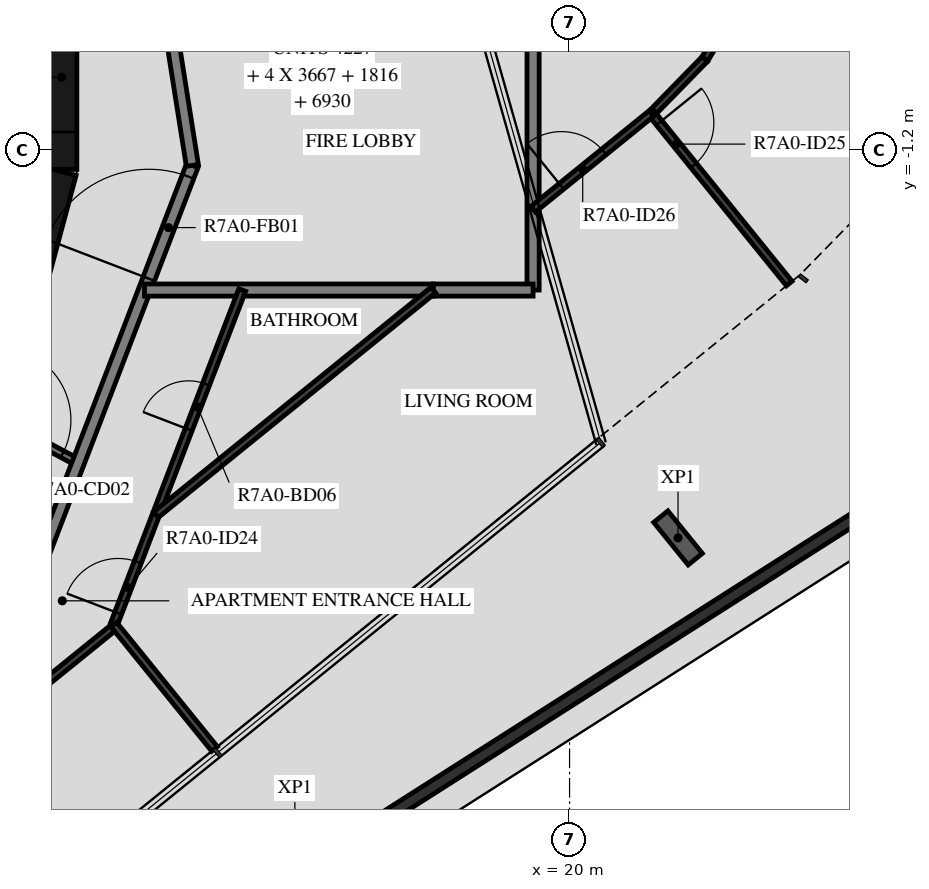
"""IFC4 building model, lengths in metres.
Left out: names, types, materials, properties, quantities, classifications, styles, units other than length and angle.
Written with IfcOpenShell. Run it as: python <this file> out.ifc"""

import sys

from ifc_helpers import new_model, si_unit, direction, frame, frame_2d, origin, origin_2d, place, context, subcontext, project, spatial, rectangle, i_section, extrude, element, fill, save


model = new_model("IFC4")
c1 = context("Model", 3, precision=1e-05, world=origin(), true_north=direction((0.0, 1.0)))
c2 = subcontext(c1, "Body", "Model", "MODEL_VIEW")
j1 = project(units=[si_unit("LENGTHUNIT", "METRE"), si_unit("PLANEANGLEUNIT", "RADIAN")], contexts=[c1])
p1 = place(None, origin())
s1 = spatial("IfcSite", under=j1, at=p1, CompositionType="ELEMENT")
p2 = place(p1, origin())
s2 = spatial("IfcBuilding", under=s1, at=p2, CompositionType="ELEMENT")
p3 = place(p2, frame((0.0, 0.0, 263.4)))
s3 = spatial("IfcBuildingStorey", under=s2, at=p3, CompositionType="ELEMENT", Elevation=263.4)
p4 = place(p3, frame((21.784, -7.576, -0.45), z_axis=(0.0, 0.0, 1.0), x_axis=(-0.777146167973, -0.629320136024, 0.0)))
e1 = element("IfcColumn", 1, at=p4, inside=s3, PredefinedType="COLUMN", context=c2, shape_type="SweptSolid", body=[
    extrude(i_section(OverallWidth=0.3, OverallDepth=0.9, WebThickness=0.019, FlangeThickness=0.035, FilletRadius=0.03, at=origin_2d()), origin(), (0.0, 0.0, 1.0), 3.57),
])
p5 = place(p3, frame((24.757, -7.212, 0.03), z_axis=(0.0, 0.0, 1.0), x_axis=(-0.843392095095, -0.537298589177, 0.0)))
e2 = element("IfcWall", 2, at=p5, inside=s3, PredefinedType="PARAPET", context=c2, shape_type="SweptSolid", body=[
    extrude(rectangle(XDim=34.009, YDim=0.2, at=frame_2d((17.004, 0.0))), origin(), (0.0, 0.0, 1.0), 1.5),
])
p6 = place(p3, frame((10.858, -4.479, 0.0), z_axis=(0.0, 0.0, 1.0), x_axis=(0.258734743916, 0.965948410781, 0.0)))
e3 = element("IfcWall", 3, at=p6, inside=s3, PredefinedType="SHEAR", context=c2, shape_type="SweptSolid", body=[
    extrude(rectangle(XDim=3.033, YDim=0.5, at=frame_2d((1.516, 0.0))), origin(), (0.0, 0.0, 1.0), 3.12),
])
p7 = place(p3, frame((11.647, -1.516, 0.0), z_axis=(0.0, 0.0, 1.0), x_axis=(0.0, 1.0, 0.0)))
e4 = element("IfcWall", 4, at=p7, inside=s3, PredefinedType="SHEAR", context=c2, shape_type="SweptSolid", body=[
    extrude(rectangle(XDim=3.033, YDim=0.5, at=frame_2d((1.516, 0.0))), origin(), (0.0, 0.0, 1.0), 3.12),
])
p8 = place(p7, frame((0.616, 0.0, 0.0)))
e5 = element("IfcOpeningElement", 5, at=p8, cuts=e4, PredefinedType="OPENING", context=c2, shape_type="SweptSolid", body=[
    extrude(rectangle(XDim=1.8, YDim=2.1, at=frame_2d((0.9, 1.05))), frame((0.0, 0.26, 0.0), z_axis=(0.0, -1.0, 0.0), x_axis=(1.0, 0.0, 0.0)), (0.0, 0.0, 1.0), 0.52),
])
p9 = place(p3, frame((10.511, -5.589, 0.0), z_axis=(0.0, 0.0, 1.0), x_axis=(0.882983002821, -0.469404960273, 0.0)))
e6 = element("IfcWall", 6, at=p9, inside=s3, PredefinedType="PARTITIONING", context=c2, shape_type="SweptSolid", body=[
    extrude(rectangle(XDim=1.596, YDim=0.12, at=frame_2d((0.798, 0.0))), origin(), (0.0, 0.0, 1.0), 3.12),
])
p10 = place(p9, frame((0.1, 0.0, 0.0)))
e7 = element("IfcOpeningElement", 7, at=p10, cuts=e6, PredefinedType="OPENING", context=c2, shape_type="SweptSolid", body=[
    extrude(rectangle(XDim=1.2, YDim=2.1, at=frame_2d((0.6, 1.05))), frame((0.0, 0.07, 0.0), z_axis=(0.0, -1.0, 0.0), x_axis=(1.0, 0.0, 0.0)), (0.0, 0.0, 1.0), 0.14),
])
p11 = place(p3, frame((11.223, -8.154, 0.0), z_axis=(0.0, 0.0, 1.0), x_axis=(0.358341090983, 0.93359073609, 0.0)))
e8 = element("IfcWall", 8, at=p11, inside=s3, PredefinedType="STANDARD", context=c2, shape_type="SweptSolid", body=[
    extrude(rectangle(XDim=7.181, YDim=0.2, at=frame_2d((3.59, 0.0))), origin(), (0.0, 0.0, 1.0), 3.12),
])
p12 = place(p11, frame((5.185, 0.0, 0.0)))
e9 = element("IfcOpeningElement", 9, at=p12, cuts=e8, PredefinedType="OPENING", context=c2, shape_type="SweptSolid", body=[
    extrude(rectangle(XDim=1.8, YDim=2.1, at=frame_2d((0.9, 1.05))), frame((0.0, 0.11, 0.0), z_axis=(0.0, -1.0, 0.0), x_axis=(1.0, 0.0, 0.0)), (0.0, 0.0, 1.0), 0.22),
])
p13 = place(p3, frame((13.797, -1.45, 0.0), z_axis=(0.0, 0.0, 1.0), x_axis=(-0.156421704315, 0.987690361611, 0.0)))
e10 = element("IfcWall", 10, at=p13, inside=s3, PredefinedType="STANDARD", context=c2, shape_type="SweptSolid", body=[
    extrude(rectangle(XDim=7.181, YDim=0.2, at=frame_2d((3.591, 0.0))), origin(), (0.0, 0.0, 1.0), 3.12),
])
p14 = place(p3, frame((13.01, -3.5, 0.0), z_axis=(0.0, 0.0, 1.0), x_axis=(1.0, 0.0, 0.0)))
e11 = element("IfcWall", 11, at=p14, inside=s3, PredefinedType="STANDARD", context=c2, shape_type="SweptSolid", body=[
    extrude(rectangle(XDim=4.75, YDim=0.2, at=frame_2d((2.375, 0.0))), origin(), (0.0, 0.0, 1.0), 3.12),
])
p15 = place(p3, frame((19.4, -3.5, 0.0), z_axis=(0.0, 0.0, 1.0), x_axis=(0.0, 1.0, 0.0)))
e12 = element("IfcWall", 12, at=p15, inside=s3, PredefinedType="STANDARD", context=c2, shape_type="SweptSolid", body=[
    extrude(rectangle(XDim=5.021, YDim=0.2, at=frame_2d((2.511, 0.0))), origin(), (0.0, 0.0, 1.0), 3.12),
])
p16 = place(p3, frame((17.76, -3.5, 0.0), z_axis=(0.0, 0.0, 1.0), x_axis=(1.0, 0.0, 0.0)))
e13 = element("IfcWall", 13, at=p16, inside=s3, PredefinedType="STANDARD", context=c2, shape_type="SweptSolid", body=[
    extrude(rectangle(XDim=1.64, YDim=0.2, at=frame_2d((0.82, 0.0))), origin(), (0.0, 0.0, 1.0), 3.12),
])
p17 = place(p3, frame((6.274, -14.092, 0.0), z_axis=(0.0, 0.0, 1.0), x_axis=(0.777135206268, 0.62933367237, 0.0)))
e14 = element("IfcWall", 14, at=p17, inside=s3, PredefinedType="PARTITIONING", context=c2, shape_type="SweptSolid", body=[
    extrude(rectangle(XDim=7.985, YDim=0.12, at=frame_2d((3.992, 0.0))), origin(), (0.0, 0.0, 1.0), 3.12),
])
p18 = place(p17, frame((0.2, 0.0, 0.0)))
e15 = element("IfcOpeningElement", 15, at=p18, cuts=e14, PredefinedType="OPENING", context=c2, shape_type="SweptSolid", body=[
    extrude(rectangle(XDim=0.9, YDim=2.1, at=frame_2d((0.45, 1.05))), frame((0.0, 0.07, 0.0), z_axis=(0.0, -1.0, 0.0), x_axis=(1.0, 0.0, 0.0)), (0.0, 0.0, 1.0), 0.14),
])
p19 = place(p3, frame((12.505, -9.001, 0.0), z_axis=(0.0, 0.0, 1.0), x_axis=(0.358373707046, 0.933578216379, 0.0)))
e16 = element("IfcWall", 16, at=p19, inside=s3, PredefinedType="PARTITIONING", context=c2, shape_type="SweptSolid", body=[
    extrude(rectangle(XDim=5.892, YDim=0.12, at=frame_2d((2.946, 0.0))), origin(), (0.0, 0.0, 1.0), 3.12),
])
p20 = place(p19, frame((0.2, 0.0, 0.0)))
e17 = element("IfcOpeningElement", 17, at=p20, cuts=e16, PredefinedType="OPENING", context=c2, shape_type="SweptSolid", body=[
    extrude(rectangle(XDim=0.9, YDim=2.1, at=frame_2d((0.45, 1.05))), frame((0.0, 0.07, 0.0), z_axis=(0.0, -1.0, 0.0), x_axis=(1.0, 0.0, 0.0)), (0.0, 0.0, 1.0), 0.14),
])
p21 = place(p19, frame((3.436, 0.0, 0.0)))
e18 = element("IfcOpeningElement", 18, at=p21, cuts=e16, PredefinedType="OPENING", context=c2, shape_type="SweptSolid", body=[
    extrude(rectangle(XDim=0.8, YDim=2.1, at=frame_2d((0.4, 1.05))), frame((0.0, 0.07, 0.0), z_axis=(0.0, -1.0, 0.0), x_axis=(1.0, 0.0, 0.0)), (0.0, 0.0, 1.0), 0.14),
])
p22 = place(p3, frame((22.746, 1.168, 0.0), z_axis=(0.0, 0.0, 1.0), x_axis=(-0.515096534995, -0.857132171626, 0.0)))
e19 = element("IfcWall", 19, at=p22, inside=s3, PredefinedType="PARTITIONING", context=c2, shape_type="SweptSolid", body=[
    extrude(rectangle(XDim=1.016, YDim=0.12, at=frame_2d((0.508, 0.0))), origin(), (0.0, 0.0, 1.0), 3.12),
])
p23 = place(p3, frame((22.223, 0.298, 0.0), z_axis=(0.0, 0.0, 1.0), x_axis=(-0.69880109182, -0.715316037896, 0.0)))
e20 = element("IfcWall", 20, at=p23, inside=s3, PredefinedType="PARTITIONING", context=c2, shape_type="SweptSolid", body=[
    extrude(rectangle(XDim=1.227, YDim=0.12, at=frame_2d((0.614, 0.0))), origin(), (0.0, 0.0, 1.0), 3.12),
])
p24 = place(p3, frame((21.347, -0.595, 0.0), z_axis=(0.0, 0.0, 1.0), x_axis=(0.62934843781, -0.7771232488, 0.0)))
e21 = element("IfcWall", 21, at=p24, inside=s3, PredefinedType="PARTITIONING", context=c2, shape_type="SweptSolid", body=[
    extrude(rectangle(XDim=3.6, YDim=0.12, at=frame_2d((1.8, 0.0))), origin(), (0.0, 0.0, 1.0), 3.12),
])
p25 = place(p24, frame((0.2, 0.0, 0.0)))
e22 = element("IfcOpeningElement", 22, at=p25, cuts=e21, PredefinedType="OPENING", context=c2, shape_type="SweptSolid", body=[
    extrude(rectangle(XDim=0.9, YDim=2.1, at=frame_2d((0.45, 1.05))), frame((0.0, 0.07, 0.0), z_axis=(0.0, -1.0, 0.0), x_axis=(1.0, 0.0, 0.0)), (0.0, 0.0, 1.0), 0.14),
])
p26 = place(p3, frame((19.4, -2.172, 0.0), z_axis=(0.0, 0.0, 1.0), x_axis=(0.777147279935, 0.629318762862, 0.0)))
e23 = element("IfcWall", 23, at=p26, inside=s3, PredefinedType="PARTITIONING", context=c2, shape_type="SweptSolid", body=[
    extrude(rectangle(XDim=2.505, YDim=0.12, at=frame_2d((1.253, 0.0))), origin(), (0.0, 0.0, 1.0), 3.12),
])
p27 = place(p26, frame((0.6, 0.0, 0.0)))
e24 = element("IfcOpeningElement", 24, at=p27, cuts=e23, PredefinedType="OPENING", context=c2, shape_type="SweptSolid", body=[
    extrude(rectangle(XDim=0.9, YDim=2.1, at=frame_2d((0.45, 1.05))), frame((0.0, 0.07, 0.0), z_axis=(0.0, -1.0, 0.0), x_axis=(1.0, 0.0, 0.0)), (0.0, 0.0, 1.0), 0.14),
])
p28 = place(p3, frame((14.161, -11.046, 0.0), z_axis=(0.0, 0.0, 1.0), x_axis=(-0.62931028473, 0.777154145284, 0.0)))
e25 = element("IfcWall", 25, at=p28, inside=s3, PredefinedType="PARTITIONING", context=c2, shape_type="SweptSolid", body=[
    extrude(rectangle(XDim=2.632, YDim=0.12, at=frame_2d((1.316, 0.0))), origin(), (0.0, 0.0, 1.0), 2.73),
])
p29 = place(p3, frame((17.76, -3.5, 0.0), z_axis=(0.0, 0.0, 1.0), x_axis=(-0.777133455716, -0.62933583404, 0.0)))
e26 = element("IfcWall", 26, at=p29, inside=s3, PredefinedType="PARTITIONING", context=c2, shape_type="SweptSolid", body=[
    extrude(rectangle(XDim=5.869, YDim=0.12, at=frame_2d((2.935, 0.0))), origin(), (0.0, 0.0, 1.0), 3.12),
])
p30 = place(p8, origin())
e27 = element("IfcDoor", 27, at=p30, inside=s3, OperationType="DOUBLE_DOOR_SINGLE_SWING", PredefinedType="DOOR", context=c2, shape_type="SweptSolid", body=[
    extrude(rectangle(XDim=1.8, YDim=2.1, at=frame_2d((0.9, 1.05))), frame((0.0, 0.025, 0.0), z_axis=(0.0, -1.0, 0.0), x_axis=(1.0, 0.0, 0.0)), (0.0, 0.0, 1.0), 0.05),
])
fill(e5, e27)
p31 = place(p20, origin())
e28 = element("IfcDoor", 28, at=p31, inside=s3, OperationType="SINGLE_SWING_RIGHT", PredefinedType="DOOR", context=c2, shape_type="SweptSolid", body=[
    extrude(rectangle(XDim=0.9, YDim=2.1, at=frame_2d((0.45, 1.05))), frame((0.0, 0.025, 0.0), z_axis=(0.0, -1.0, 0.0), x_axis=(1.0, 0.0, 0.0)), (0.0, 0.0, 1.0), 0.05),
])
fill(e17, e28)
p32 = place(p21, origin())
e29 = element("IfcDoor", 29, at=p32, inside=s3, OperationType="SINGLE_SWING_RIGHT", PredefinedType="DOOR", context=c2, shape_type="SweptSolid", body=[
    extrude(rectangle(XDim=0.8, YDim=2.1, at=frame_2d((0.4, 1.05))), frame((0.0, 0.025, 0.0), z_axis=(0.0, -1.0, 0.0), x_axis=(1.0, 0.0, 0.0)), (0.0, 0.0, 1.0), 0.05),
])
fill(e18, e29)
p33 = place(p25, origin())
e30 = element("IfcDoor", 30, at=p33, inside=s3, OperationType="SINGLE_SWING_RIGHT", PredefinedType="DOOR", context=c2, shape_type="SweptSolid", body=[
    extrude(rectangle(XDim=0.9, YDim=2.1, at=frame_2d((0.45, 1.05))), frame((0.0, 0.025, 0.0), z_axis=(0.0, -1.0, 0.0), x_axis=(1.0, 0.0, 0.0)), (0.0, 0.0, 1.0), 0.05),
])
fill(e22, e30)
p34 = place(p27, origin())
e31 = element("IfcDoor", 31, at=p34, inside=s3, OperationType="SINGLE_SWING_LEFT", PredefinedType="DOOR", context=c2, shape_type="SweptSolid", body=[
    extrude(rectangle(XDim=0.9, YDim=2.1, at=frame_2d((0.45, 1.05))), frame((0.0, 0.025, 0.0), z_axis=(0.0, -1.0, 0.0), x_axis=(1.0, 0.0, 0.0)), (0.0, 0.0, 1.0), 0.05),
])
fill(e24, e31)
p35 = place(p10, origin())
e32 = element("IfcDoor", 32, at=p35, inside=s3, OperationType="DOUBLE_DOOR_SINGLE_SWING", PredefinedType="DOOR", context=c2, shape_type="SweptSolid", body=[
    extrude(rectangle(XDim=1.2, YDim=2.1, at=frame_2d((0.6, 1.05))), frame((0.0, 0.025, 0.0), z_axis=(0.0, -1.0, 0.0), x_axis=(1.0, 0.0, 0.0)), (0.0, 0.0, 1.0), 0.05),
])
fill(e7, e32)
p36 = place(p12, origin())
e33 = element("IfcDoor", 33, at=p36, inside=s3, OperationType="DOUBLE_DOOR_SINGLE_SWING", PredefinedType="DOOR", context=c2, shape_type="SweptSolid", body=[
    extrude(rectangle(XDim=1.8, YDim=2.1, at=frame_2d((0.9, 1.05))), frame((0.0, 0.025, 0.0), z_axis=(0.0, -1.0, 0.0), x_axis=(1.0, 0.0, 0.0)), (0.0, 0.0, 1.0), 0.05),
])
fill(e9, e33)
save(model, sys.argv[1])
